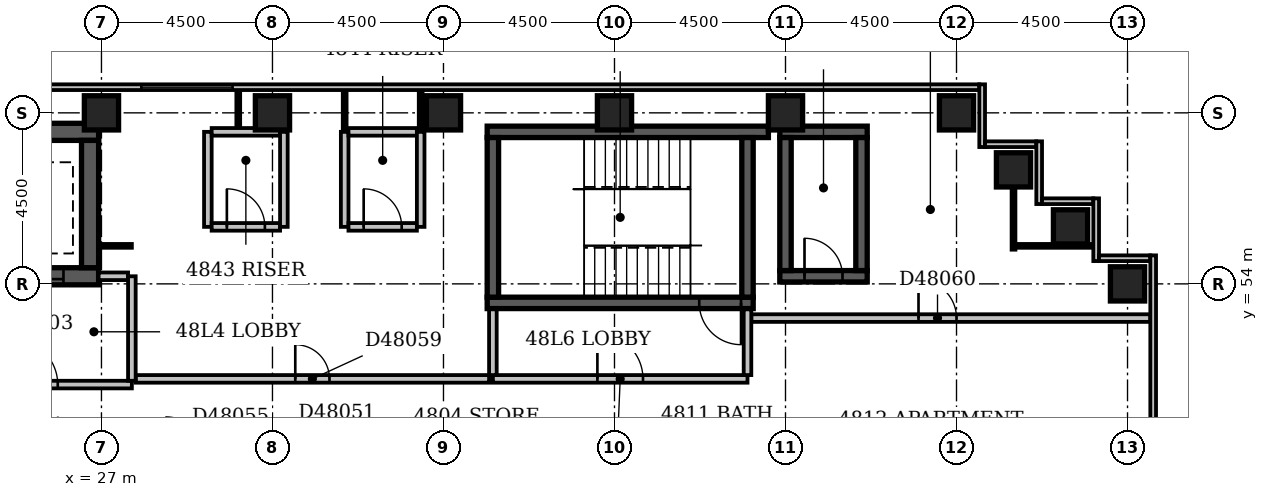
"""IFC4 building model, lengths in metres.
Left out: names, types, materials, properties, quantities, classifications, styles, units other than length and angle.
Written with IfcOpenShell. Run it as: python <this file> out.ifc"""

import sys

from ifc_helpers import new_model, si_unit, direction, frame, frame_2d, origin, origin_2d, place, context, subcontext, project, spatial, rectangle, extrude, element, fill, save


model = new_model("IFC4")
c1 = context("Model", 3, precision=1e-05, world=origin(), true_north=direction((0.0, 1.0)))
c2 = subcontext(c1, "Body", "Model", "MODEL_VIEW")
j1 = project(units=[si_unit("LENGTHUNIT", "METRE"), si_unit("PLANEANGLEUNIT", "RADIAN")], contexts=[c1])
p1 = place(None, origin())
s1 = spatial("IfcSite", under=j1, at=p1, CompositionType="ELEMENT")
p2 = place(p1, origin())
s2 = spatial("IfcBuilding", under=s1, at=p2, CompositionType="ELEMENT")
p3 = place(p2, frame((0.0, 0.0, 189.8)))
s3 = spatial("IfcBuildingStorey", under=s2, at=p3, CompositionType="ELEMENT", Elevation=189.8)
p4 = place(p3, frame((23.975, 54.2, -0.3), z_axis=(0.0, 0.0, 1.0), x_axis=(1.0, 0.0, 0.0)))
e1 = element("IfcWall", 1, at=p4, inside=s3, PredefinedType="SHEAR", context=c2, shape_type="SweptSolid", body=[
    extrude(rectangle(XDim=2.95, YDim=0.45, at=frame_2d((1.475, 0.0))), origin(), (0.0, 0.0, 1.0), 3.6),
])
p5 = place(p4, frame((0.925, 0.0, 0.3)))
e2 = element("IfcOpeningElement", 2, at=p5, cuts=e1, PredefinedType="OPENING", context=c2, shape_type="SweptSolid", body=[
    extrude(rectangle(XDim=1.1, YDim=2.1, at=frame_2d((0.55, 1.05))), frame((0.0, 0.237, 0.0), z_axis=(0.0, -1.0, 0.0), x_axis=(1.0, 0.0, 0.0)), (0.0, 0.0, 1.0), 0.474),
])
p6 = place(p3, frame((23.975, 58.0, -0.3), z_axis=(0.0, 0.0, 1.0), x_axis=(1.0, 0.0, 0.0)))
e3 = element("IfcWall", 3, at=p6, inside=s3, PredefinedType="SHEAR", context=c2, shape_type="SweptSolid", body=[
    extrude(rectangle(XDim=2.95, YDim=0.45, at=frame_2d((1.475, 0.0))), origin(), (0.0, 0.0, 1.0), 3.6),
])
p7 = place(p3, frame((26.7, 54.425, -0.3), z_axis=(0.0, 0.0, 1.0), x_axis=(0.0, 1.0, 0.0)))
e4 = element("IfcWall", 4, at=p7, inside=s3, PredefinedType="SHEAR", context=c2, shape_type="SweptSolid", body=[
    extrude(rectangle(XDim=3.35, YDim=0.45, at=frame_2d((1.675, 0.0))), origin(), (0.0, 0.0, 1.0), 3.6),
])
p8 = place(p3, frame((37.15, 53.5, -0.3), z_axis=(0.0, 0.0, 1.0), x_axis=(1.0, 0.0, 0.0)))
e5 = element("IfcWall", 5, at=p8, inside=s3, PredefinedType="SHEAR", context=c2, shape_type="SweptSolid", body=[
    extrude(rectangle(XDim=7.0, YDim=0.3, at=frame_2d((3.5, 0.0))), origin(), (0.0, 0.0, 1.0), 3.6),
])
p9 = place(p8, frame((5.58, 0.0, 0.3)))
e6 = element("IfcOpeningElement", 6, at=p9, cuts=e5, PredefinedType="OPENING", context=c2, shape_type="SweptSolid", body=[
    extrude(rectangle(XDim=1.1, YDim=2.1, at=frame_2d((0.55, 1.05))), frame((0.0, 0.162, 0.0), z_axis=(0.0, -1.0, 0.0), x_axis=(1.0, 0.0, 0.0)), (0.0, 0.0, 1.0), 0.324),
])
p10 = place(p3, frame((37.15, 58.0, -0.3), z_axis=(0.0, 0.0, 1.0), x_axis=(1.0, 0.0, 0.0)))
e7 = element("IfcWall", 7, at=p10, inside=s3, PredefinedType="SHEAR", context=c2, shape_type="SweptSolid", body=[
    extrude(rectangle(XDim=7.4, YDim=0.3, at=frame_2d((3.7, 0.0))), origin(), (0.0, 0.0, 1.0), 3.6),
])
for number, where, z_axis, x_axis in (
    (8, (37.3, 53.65, -0.3), (0.0, 0.0, 1.0), (0.0, 1.0, 0.0)),
    (9, (44.0, 53.65, -0.3), (0.0, 0.0, 1.0), (0.0, 1.0, 0.0)),
):
    element("IfcWall", number, at=place(p3, frame(where, z_axis=z_axis, x_axis=x_axis)), inside=s3, PredefinedType="SHEAR", context=c2, shape_type="SweptSolid", body=[
        extrude(rectangle(XDim=4.2, YDim=0.3, at=frame_2d((2.1, 0.0))), origin(), (0.0, 0.0, 1.0), 3.6),
    ])
p11 = place(p3, frame((44.85, 54.2, -0.3), z_axis=(0.0, 0.0, 1.0), x_axis=(1.0, 0.0, 0.0)))
e10 = element("IfcWall", 10, at=p11, inside=s3, PredefinedType="SHEAR", context=c2, shape_type="SweptSolid", body=[
    extrude(rectangle(XDim=2.3, YDim=0.3, at=frame_2d((1.15, 0.0))), origin(), (0.0, 0.0, 1.0), 3.6),
])
p12 = place(p11, frame((0.65, 0.0, 0.3)))
e11 = element("IfcOpeningElement", 11, at=p12, cuts=e10, PredefinedType="OPENING", context=c2, shape_type="SweptSolid", body=[
    extrude(rectangle(XDim=1.0, YDim=2.1, at=frame_2d((0.5, 1.05))), frame((0.0, 0.162, 0.0), z_axis=(0.0, -1.0, 0.0), x_axis=(1.0, 0.0, 0.0)), (0.0, 0.0, 1.0), 0.324),
])
p13 = place(p3, frame((44.85, 58.0, -0.3), z_axis=(0.0, 0.0, 1.0), x_axis=(1.0, 0.0, 0.0)))
e12 = element("IfcWall", 12, at=p13, inside=s3, PredefinedType="SHEAR", context=c2, shape_type="SweptSolid", body=[
    extrude(rectangle(XDim=2.3, YDim=0.3, at=frame_2d((1.15, 0.0))), origin(), (0.0, 0.0, 1.0), 3.6),
])
for number, where, z_axis, x_axis in (
    (13, (45.0, 54.35, -0.3), (0.0, 0.0, 1.0), (0.0, 1.0, 0.0)),
    (14, (47.0, 54.35, -0.3), (0.0, 0.0, 1.0), (0.0, 1.0, 0.0)),
):
    element("IfcWall", number, at=place(p3, frame(where, z_axis=z_axis, x_axis=x_axis)), inside=s3, PredefinedType="SHEAR", context=c2, shape_type="SweptSolid", body=[
        extrude(rectangle(XDim=3.5, YDim=0.3, at=frame_2d((1.75, 0.0))), origin(), (0.0, 0.0, 1.0), 3.6),
    ])
for number, where, z_axis, x_axis in (
    (15, (54.0, 54.0, -0.3), (0.0, 0.0, 1.0), (1.0, 0.0, 0.0)),
    (16, (52.5, 55.5, -0.3), (0.0, 0.0, 1.0), (1.0, 0.0, 0.0)),
    (17, (51.0, 57.0, -0.3), (0.0, 0.0, 1.0), (1.0, 0.0, 0.0)),
    (18, (27.0, 58.5, -0.3), (0.0, 0.0, 1.0), (1.0, 0.0, 0.0)),
    (19, (31.5, 58.5, -0.3), (0.0, 0.0, 1.0), (1.0, 0.0, 0.0)),
    (20, (36.0, 58.5, -0.3), (0.0, 0.0, 1.0), (1.0, 0.0, 0.0)),
    (21, (40.5, 58.5, -0.3), (0.0, 0.0, 1.0), (1.0, 0.0, 0.0)),
    (22, (45.0, 58.5, -0.3), (0.0, 0.0, 1.0), (1.0, 0.0, 0.0)),
    (23, (49.5, 58.5, -0.3), (0.0, 0.0, 1.0), (1.0, 0.0, 0.0)),
):
    element("IfcColumn", number, at=place(p3, frame(where, z_axis=z_axis, x_axis=x_axis)), inside=s3, PredefinedType="COLUMN", context=c2, shape_type="SweptSolid", body=[
        extrude(rectangle(XDim=0.9, YDim=0.9, at=origin_2d()), origin(), (0.0, 0.0, 1.0), 3.6),
    ])
p14 = place(p3, frame((54.675, 39.9, 0.0), z_axis=(0.0, 0.0, 1.0), x_axis=(0.0, 1.0, 0.0)))
e24 = element("IfcWall", 24, at=p14, inside=s3, PredefinedType="STANDARD", context=c2, shape_type="SweptSolid", body=[
    extrude(rectangle(XDim=14.85, YDim=0.15, at=frame_2d((7.425, 0.0))), origin(), (0.0, 0.0, 1.0), 2.7),
])
p15 = place(p3, frame((54.6, 54.675, 0.0), z_axis=(0.0, 0.0, 1.0), x_axis=(-1.0, 0.0, 0.0)))
e25 = element("IfcWall", 25, at=p15, inside=s3, PredefinedType="STANDARD", context=c2, shape_type="SweptSolid", body=[
    extrude(rectangle(XDim=1.35, YDim=0.15, at=frame_2d((0.675, 0.0))), origin(), (0.0, 0.0, 1.0), 2.7),
])
p16 = place(p3, frame((53.175, 54.6, 0.0), z_axis=(0.0, 0.0, 1.0), x_axis=(0.0, 1.0, 0.0)))
e26 = element("IfcWall", 26, at=p16, inside=s3, PredefinedType="STANDARD", context=c2, shape_type="SweptSolid", body=[
    extrude(rectangle(XDim=1.65, YDim=0.15, at=frame_2d((0.825, 0.0))), origin(), (0.0, 0.0, 1.0), 2.7),
])
p17 = place(p3, frame((53.1, 56.175, 0.0), z_axis=(0.0, 0.0, 1.0), x_axis=(-1.0, 0.0, 0.0)))
e27 = element("IfcWall", 27, at=p17, inside=s3, PredefinedType="STANDARD", context=c2, shape_type="SweptSolid", body=[
    extrude(rectangle(XDim=1.35, YDim=0.15, at=frame_2d((0.675, 0.0))), origin(), (0.0, 0.0, 1.0), 2.7),
])
p18 = place(p3, frame((51.675, 56.1, 0.0), z_axis=(0.0, 0.0, 1.0), x_axis=(0.0, 1.0, 0.0)))
e28 = element("IfcWall", 28, at=p18, inside=s3, PredefinedType="STANDARD", context=c2, shape_type="SweptSolid", body=[
    extrude(rectangle(XDim=1.65, YDim=0.15, at=frame_2d((0.825, 0.0))), origin(), (0.0, 0.0, 1.0), 2.7),
])
p19 = place(p3, frame((51.6, 57.675, 0.0), z_axis=(0.0, 0.0, 1.0), x_axis=(-1.0, 0.0, 0.0)))
e29 = element("IfcWall", 29, at=p19, inside=s3, PredefinedType="STANDARD", context=c2, shape_type="SweptSolid", body=[
    extrude(rectangle(XDim=1.35, YDim=0.15, at=frame_2d((0.675, 0.0))), origin(), (0.0, 0.0, 1.0), 2.7),
])
p20 = place(p3, frame((50.175, 57.6, 0.0), z_axis=(0.0, 0.0, 1.0), x_axis=(0.0, 1.0, 0.0)))
e30 = element("IfcWall", 30, at=p20, inside=s3, PredefinedType="STANDARD", context=c2, shape_type="SweptSolid", body=[
    extrude(rectangle(XDim=1.65, YDim=0.15, at=frame_2d((0.825, 0.0))), origin(), (0.0, 0.0, 1.0), 2.7),
])
p21 = place(p3, frame((50.1, 59.175, 0.0), z_axis=(0.0, 0.0, 1.0), x_axis=(-1.0, 0.0, 0.0)))
e31 = element("IfcWall", 31, at=p21, inside=s3, PredefinedType="STANDARD", context=c2, shape_type="SweptSolid", body=[
    extrude(rectangle(XDim=50.85, YDim=0.15, at=frame_2d((25.425, 0.0))), origin(), (0.0, 0.0, 1.0), 2.7),
])
p22 = place(p21, frame((19.65, 0.0, 0.6)))
e32 = element("IfcOpeningElement", 32, at=p22, cuts=e31, PredefinedType="OPENING", context=c2, shape_type="SweptSolid", body=[
    extrude(rectangle(XDim=2.4, YDim=1.8, at=frame_2d((1.2, 0.9))), frame((0.0, 0.087, 0.0), z_axis=(0.0, -1.0, 0.0), x_axis=(1.0, 0.0, 0.0)), (0.0, 0.0, 1.0), 0.174),
])
p23 = place(p3, frame((23.0, 51.35, 0.0), z_axis=(0.0, 0.0, 1.0), x_axis=(1.0, 0.0, 0.0)))
e33 = element("IfcWall", 33, at=p23, inside=s3, PredefinedType="PARTITIONING", context=c2, shape_type="SweptSolid", body=[
    extrude(rectangle(XDim=4.8, YDim=0.2, at=frame_2d((2.4, 0.0))), origin(), (0.0, 0.0, 1.0), 3.3),
])
p24 = place(p23, frame((1.65, 0.0, 0.0)))
e34 = element("IfcOpeningElement", 34, at=p24, cuts=e33, PredefinedType="OPENING", context=c2, shape_type="SweptSolid", body=[
    extrude(rectangle(XDim=1.2, YDim=2.1, at=frame_2d((0.6, 1.05))), frame((0.0, 0.112, 0.0), z_axis=(0.0, -1.0, 0.0), x_axis=(1.0, 0.0, 0.0)), (0.0, 0.0, 1.0), 0.224),
])
p25 = place(p3, frame((27.8, 51.45, 0.0), z_axis=(0.0, 0.0, 1.0), x_axis=(0.0, 1.0, 0.0)))
e35 = element("IfcWall", 35, at=p25, inside=s3, PredefinedType="PARTITIONING", context=c2, shape_type="SweptSolid", body=[
    extrude(rectangle(XDim=2.75, YDim=0.2, at=frame_2d((1.375, 0.0))), origin(), (0.0, 0.0, 1.0), 3.3),
])
p26 = place(p3, frame((26.925, 54.2, 0.0), z_axis=(0.0, 0.0, 1.0), x_axis=(1.0, 0.0, 0.0)))
e36 = element("IfcWall", 36, at=p26, inside=s3, PredefinedType="PARTITIONING", context=c2, shape_type="SweptSolid", body=[
    extrude(rectangle(XDim=0.775, YDim=0.2, at=frame_2d((0.387, 0.0))), origin(), (0.0, 0.0, 1.0), 3.3),
])
p27 = place(p3, frame((37.3, 51.5, 0.0), z_axis=(0.0, 0.0, 1.0), x_axis=(1.0, 0.0, 0.0)))
e37 = element("IfcWall", 37, at=p27, inside=s3, PredefinedType="PARTITIONING", context=c2, shape_type="SweptSolid", body=[
    extrude(rectangle(XDim=6.7, YDim=0.2, at=frame_2d((3.35, 0.0))), origin(), (0.0, 0.0, 1.0), 3.3),
])
p28 = place(p27, frame((2.75, 0.0, 0.0)))
e38 = element("IfcOpeningElement", 38, at=p28, cuts=e37, PredefinedType="OPENING", context=c2, shape_type="SweptSolid", body=[
    extrude(rectangle(XDim=1.2, YDim=2.1, at=frame_2d((0.6, 1.05))), frame((0.0, 0.112, 0.0), z_axis=(0.0, -1.0, 0.0), x_axis=(1.0, 0.0, 0.0)), (0.0, 0.0, 1.0), 0.224),
])
for number, where, z_axis, x_axis in (
    (39, (44.0, 51.6, 0.0), (0.0, 0.0, 1.0), (0.0, 1.0, 0.0)),
    (40, (37.3, 51.6, 0.0), (0.0, 0.0, 1.0), (0.0, 1.0, 0.0)),
):
    element("IfcWall", number, at=place(p3, frame(where, z_axis=z_axis, x_axis=x_axis)), inside=s3, PredefinedType="PARTITIONING", context=c2, shape_type="SweptSolid", body=[
        extrude(rectangle(XDim=1.73, YDim=0.2, at=frame_2d((0.865, 0.0))), origin(), (0.0, 0.0, 1.0), 3.3),
    ])
p29 = place(p3, frame((27.9, 51.5, 0.0), z_axis=(0.0, 0.0, 1.0), x_axis=(1.0, 0.0, 0.0)))
e41 = element("IfcWall", 41, at=p29, inside=s3, PredefinedType="PARTITIONING", context=c2, shape_type="SweptSolid", body=[
    extrude(rectangle(XDim=9.3, YDim=0.2, at=frame_2d((4.65, 0.0))), origin(), (0.0, 0.0, 1.0), 3.3),
])
p30 = place(p29, frame((4.2, 0.0, 0.0)))
e42 = element("IfcOpeningElement", 42, at=p30, cuts=e41, PredefinedType="OPENING", context=c2, shape_type="SweptSolid", body=[
    extrude(rectangle(XDim=0.9, YDim=2.1, at=frame_2d((0.45, 1.05))), frame((0.0, 0.112, 0.0), z_axis=(0.0, -1.0, 0.0), x_axis=(1.0, 0.0, 0.0)), (0.0, 0.0, 1.0), 0.224),
])
p31 = place(p3, frame((44.1, 53.1, 0.0), z_axis=(0.0, 0.0, 1.0), x_axis=(1.0, 0.0, 0.0)))
e43 = element("IfcWall", 43, at=p31, inside=s3, PredefinedType="PARTITIONING", context=c2, shape_type="SweptSolid", body=[
    extrude(rectangle(XDim=10.5, YDim=0.2, at=frame_2d((5.25, 0.0))), origin(), (0.0, 0.0, 1.0), 3.3),
])
p32 = place(p31, frame((4.4, 0.0, 0.0)))
e44 = element("IfcOpeningElement", 44, at=p32, cuts=e43, PredefinedType="OPENING", context=c2, shape_type="SweptSolid", body=[
    extrude(rectangle(XDim=1.0, YDim=2.1, at=frame_2d((0.5, 1.05))), frame((0.0, 0.112, 0.0), z_axis=(0.0, -1.0, 0.0), x_axis=(1.0, 0.0, 0.0)), (0.0, 0.0, 1.0), 0.224),
])
p33 = place(p3, frame((51.0, 54.9, 0.0), z_axis=(0.0, 0.0, 1.0), x_axis=(0.0, 1.0, 0.0)))
e45 = element("IfcWall", 45, at=p33, inside=s3, PredefinedType="PARTITIONING", context=c2, shape_type="SweptSolid", body=[
    extrude(rectangle(XDim=1.65, YDim=0.1, at=frame_2d((0.825, 0.0))), origin(), (0.0, 0.0, 1.0), 3.3),
])
p34 = place(p3, frame((26.925, 55.0, 0.0), z_axis=(0.0, 0.0, 1.0), x_axis=(1.0, 0.0, 0.0)))
e46 = element("IfcWall", 46, at=p34, inside=s3, PredefinedType="PARTITIONING", context=c2, shape_type="SweptSolid", body=[
    extrude(rectangle(XDim=0.875, YDim=0.1, at=frame_2d((0.438, 0.0))), origin(), (0.0, 0.0, 1.0), 3.3),
])
p35 = place(p3, frame((51.05, 55.0, 0.0), z_axis=(0.0, 0.0, 1.0), x_axis=(1.0, 0.0, 0.0)))
e47 = element("IfcWall", 47, at=p35, inside=s3, PredefinedType="PARTITIONING", context=c2, shape_type="SweptSolid", body=[
    extrude(rectangle(XDim=2.05, YDim=0.1, at=frame_2d((1.025, 0.0))), origin(), (0.0, 0.0, 1.0), 3.3),
])
p36 = place(p3, frame((29.8, 55.5, 0.0), z_axis=(0.0, 0.0, 1.0), x_axis=(0.0, 1.0, 0.0)))
e48 = element("IfcWall", 48, at=p36, inside=s3, PredefinedType="PARTITIONING", context=c2, shape_type="SweptSolid", body=[
    extrude(rectangle(XDim=2.5, YDim=0.2, at=frame_2d((1.25, 0.0))), origin(), (0.0, 0.0, 1.0), 3.3),
])
p37 = place(p3, frame((29.9, 55.5, 0.0), z_axis=(0.0, 0.0, 1.0), x_axis=(1.0, 0.0, 0.0)))
e49 = element("IfcWall", 49, at=p37, inside=s3, PredefinedType="PARTITIONING", context=c2, shape_type="SweptSolid", body=[
    extrude(rectangle(XDim=1.8, YDim=0.2, at=frame_2d((0.9, 0.0))), origin(), (0.0, 0.0, 1.0), 3.3),
])
p38 = place(p37, frame((0.4, 0.0, 0.0)))
e50 = element("IfcOpeningElement", 50, at=p38, cuts=e49, PredefinedType="OPENING", context=c2, shape_type="SweptSolid", body=[
    extrude(rectangle(XDim=1.0, YDim=2.1, at=frame_2d((0.5, 1.05))), frame((0.0, 0.112, 0.0), z_axis=(0.0, -1.0, 0.0), x_axis=(1.0, 0.0, 0.0)), (0.0, 0.0, 1.0), 0.224),
])
for number, where, z_axis, x_axis in (
    (51, (31.8, 55.5, 0.0), (0.0, 0.0, 1.0), (0.0, 1.0, 0.0)),
    (52, (33.4, 55.5, 0.0), (0.0, 0.0, 1.0), (0.0, 1.0, 0.0)),
):
    element("IfcWall", number, at=place(p3, frame(where, z_axis=z_axis, x_axis=x_axis)), inside=s3, PredefinedType="PARTITIONING", context=c2, shape_type="SweptSolid", body=[
        extrude(rectangle(XDim=2.5, YDim=0.2, at=frame_2d((1.25, 0.0))), origin(), (0.0, 0.0, 1.0), 3.3),
    ])
p39 = place(p3, frame((33.5, 55.5, 0.0), z_axis=(0.0, 0.0, 1.0), x_axis=(1.0, 0.0, 0.0)))
e53 = element("IfcWall", 53, at=p39, inside=s3, PredefinedType="PARTITIONING", context=c2, shape_type="SweptSolid", body=[
    extrude(rectangle(XDim=1.8, YDim=0.2, at=frame_2d((0.9, 0.0))), origin(), (0.0, 0.0, 1.0), 3.3),
])
p40 = place(p39, frame((0.4, 0.0, 0.0)))
e54 = element("IfcOpeningElement", 54, at=p40, cuts=e53, PredefinedType="OPENING", context=c2, shape_type="SweptSolid", body=[
    extrude(rectangle(XDim=1.0, YDim=2.1, at=frame_2d((0.5, 1.05))), frame((0.0, 0.112, 0.0), z_axis=(0.0, -1.0, 0.0), x_axis=(1.0, 0.0, 0.0)), (0.0, 0.0, 1.0), 0.224),
])
p41 = place(p3, frame((35.4, 55.5, 0.0), z_axis=(0.0, 0.0, 1.0), x_axis=(0.0, 1.0, 0.0)))
e55 = element("IfcWall", 55, at=p41, inside=s3, PredefinedType="PARTITIONING", context=c2, shape_type="SweptSolid", body=[
    extrude(rectangle(XDim=2.5, YDim=0.2, at=frame_2d((1.25, 0.0))), origin(), (0.0, 0.0, 1.0), 2.4),
])
p42 = place(p3, frame((29.9, 58.0, 0.0), z_axis=(0.0, 0.0, 1.0), x_axis=(1.0, 0.0, 0.0)))
e56 = element("IfcWall", 56, at=p42, inside=s3, PredefinedType="PARTITIONING", context=c2, shape_type="SweptSolid", body=[
    extrude(rectangle(XDim=1.8, YDim=0.2, at=frame_2d((0.9, 0.0))), origin(), (0.0, 0.0, 1.0), 3.3),
])
p43 = place(p3, frame((33.4, 58.0, 0.0), z_axis=(0.0, 0.0, 1.0), x_axis=(0.0, 1.0, 0.0)))
e57 = element("IfcWall", 57, at=p43, inside=s3, PredefinedType="PARTITIONING", context=c2, shape_type="SweptSolid", body=[
    extrude(rectangle(XDim=1.1, YDim=0.1, at=frame_2d((0.55, 0.0))), origin(), (0.0, 0.0, 1.0), 3.3),
])
p44 = place(p3, frame((33.5, 58.0, 0.0), z_axis=(0.0, 0.0, 1.0), x_axis=(1.0, 0.0, 0.0)))
e58 = element("IfcWall", 58, at=p44, inside=s3, PredefinedType="PARTITIONING", context=c2, shape_type="SweptSolid", body=[
    extrude(rectangle(XDim=1.8, YDim=0.2, at=frame_2d((0.9, 0.0))), origin(), (0.0, 0.0, 1.0), 3.3),
])
p45 = place(p3, frame((35.4, 58.0, 0.0), z_axis=(0.0, 0.0, 1.0), x_axis=(0.0, 1.0, 0.0)))
e59 = element("IfcWall", 59, at=p45, inside=s3, PredefinedType="PARTITIONING", context=c2, shape_type="SweptSolid", body=[
    extrude(rectangle(XDim=1.1, YDim=0.1, at=frame_2d((0.55, 0.0))), origin(), (0.0, 0.0, 1.0), 2.4),
])
p46 = place(p3, frame((30.6, 58.1, 0.0), z_axis=(0.0, 0.0, 1.0), x_axis=(0.0, 1.0, 0.0)))
e60 = element("IfcWall", 60, at=p46, inside=s3, PredefinedType="PARTITIONING", context=c2, shape_type="SweptSolid", body=[
    extrude(rectangle(XDim=1.0, YDim=0.1, at=frame_2d((0.5, 0.0))), origin(), (0.0, 0.0, 1.0), 3.3),
])
p47 = place(p22, origin())
e61 = element("IfcWindow", 61, at=p47, inside=s3, PartitioningType="SINGLE_PANEL", PredefinedType="WINDOW", context=c2, shape_type="SweptSolid", body=[
    extrude(rectangle(XDim=2.4, YDim=1.8, at=frame_2d((1.2, 0.9))), frame((0.0, 0.03, 0.0), z_axis=(0.0, -1.0, 0.0), x_axis=(1.0, 0.0, 0.0)), (0.0, 0.0, 1.0), 0.06),
])
fill(e32, e61)
p48 = place(p24, origin())
e62 = element("IfcDoor", 62, at=p48, inside=s3, OperationType="SINGLE_SWING_LEFT", PredefinedType="DOOR", context=c2, shape_type="SweptSolid", body=[
    extrude(rectangle(XDim=1.2, YDim=2.1, at=frame_2d((0.6, 1.05))), frame((0.0, 0.025, 0.0), z_axis=(0.0, -1.0, 0.0), x_axis=(1.0, 0.0, 0.0)), (0.0, 0.0, 1.0), 0.05),
])
fill(e34, e62)
p49 = place(p5, origin())
e63 = element("IfcDoor", 63, at=p49, inside=s3, OperationType="SLIDING_TO_LEFT", PredefinedType="DOOR", context=c2, shape_type="SweptSolid", body=[
    extrude(rectangle(XDim=1.1, YDim=2.1, at=frame_2d((0.55, 1.05))), frame((0.0, 0.025, 0.0), z_axis=(0.0, -1.0, 0.0), x_axis=(1.0, 0.0, 0.0)), (0.0, 0.0, 1.0), 0.05),
])
fill(e2, e63)
p50 = place(p28, origin())
e64 = element("IfcDoor", 64, at=p50, inside=s3, OperationType="SINGLE_SWING_LEFT", PredefinedType="DOOR", context=c2, shape_type="SweptSolid", body=[
    extrude(rectangle(XDim=1.2, YDim=2.1, at=frame_2d((0.6, 1.05))), frame((0.0, 0.025, 0.0), z_axis=(0.0, -1.0, 0.0), x_axis=(1.0, 0.0, 0.0)), (0.0, 0.0, 1.0), 0.05),
])
fill(e38, e64)
p51 = place(p12, origin())
e65 = element("IfcDoor", 65, at=p51, inside=s3, OperationType="SINGLE_SWING_LEFT", PredefinedType="DOOR", context=c2, shape_type="SweptSolid", body=[
    extrude(rectangle(XDim=1.0, YDim=2.1, at=frame_2d((0.5, 1.05))), frame((0.0, 0.025, 0.0), z_axis=(0.0, -1.0, 0.0), x_axis=(1.0, 0.0, 0.0)), (0.0, 0.0, 1.0), 0.05),
])
fill(e11, e65)
p52 = place(p9, origin())
e66 = element("IfcDoor", 66, at=p52, inside=s3, OperationType="SINGLE_SWING_RIGHT", PredefinedType="DOOR", context=c2, shape_type="SweptSolid", body=[
    extrude(rectangle(XDim=1.1, YDim=2.1, at=frame_2d((0.55, 1.05))), frame((0.0, 0.025, 0.0), z_axis=(0.0, -1.0, 0.0), x_axis=(1.0, 0.0, 0.0)), (0.0, 0.0, 1.0), 0.05),
])
fill(e6, e66)
p53 = place(p30, origin())
e67 = element("IfcDoor", 67, at=p53, inside=s3, OperationType="SINGLE_SWING_LEFT", PredefinedType="DOOR", context=c2, shape_type="SweptSolid", body=[
    extrude(rectangle(XDim=0.9, YDim=2.1, at=frame_2d((0.45, 1.05))), frame((0.0, 0.025, 0.0), z_axis=(0.0, -1.0, 0.0), x_axis=(1.0, 0.0, 0.0)), (0.0, 0.0, 1.0), 0.05),
])
fill(e42, e67)
p54 = place(p32, origin())
e68 = element("IfcDoor", 68, at=p54, inside=s3, OperationType="SINGLE_SWING_LEFT", PredefinedType="DOOR", context=c2, shape_type="SweptSolid", body=[
    extrude(rectangle(XDim=1.0, YDim=2.1, at=frame_2d((0.5, 1.05))), frame((0.0, 0.025, 0.0), z_axis=(0.0, -1.0, 0.0), x_axis=(1.0, 0.0, 0.0)), (0.0, 0.0, 1.0), 0.05),
])
fill(e44, e68)
p55 = place(p38, origin())
e69 = element("IfcDoor", 69, at=p55, inside=s3, OperationType="SINGLE_SWING_LEFT", PredefinedType="DOOR", context=c2, shape_type="SweptSolid", body=[
    extrude(rectangle(XDim=1.0, YDim=2.1, at=frame_2d((0.5, 1.05))), frame((0.0, 0.025, 0.0), z_axis=(0.0, -1.0, 0.0), x_axis=(1.0, 0.0, 0.0)), (0.0, 0.0, 1.0), 0.05),
])
fill(e50, e69)
p56 = place(p40, origin())
e70 = element("IfcDoor", 70, at=p56, inside=s3, OperationType="SINGLE_SWING_LEFT", PredefinedType="DOOR", context=c2, shape_type="SweptSolid", body=[
    extrude(rectangle(XDim=1.0, YDim=2.1, at=frame_2d((0.5, 1.05))), frame((0.0, 0.025, 0.0), z_axis=(0.0, -1.0, 0.0), x_axis=(1.0, 0.0, 0.0)), (0.0, 0.0, 1.0), 0.05),
])
fill(e54, e70)
save(model, sys.argv[1])
